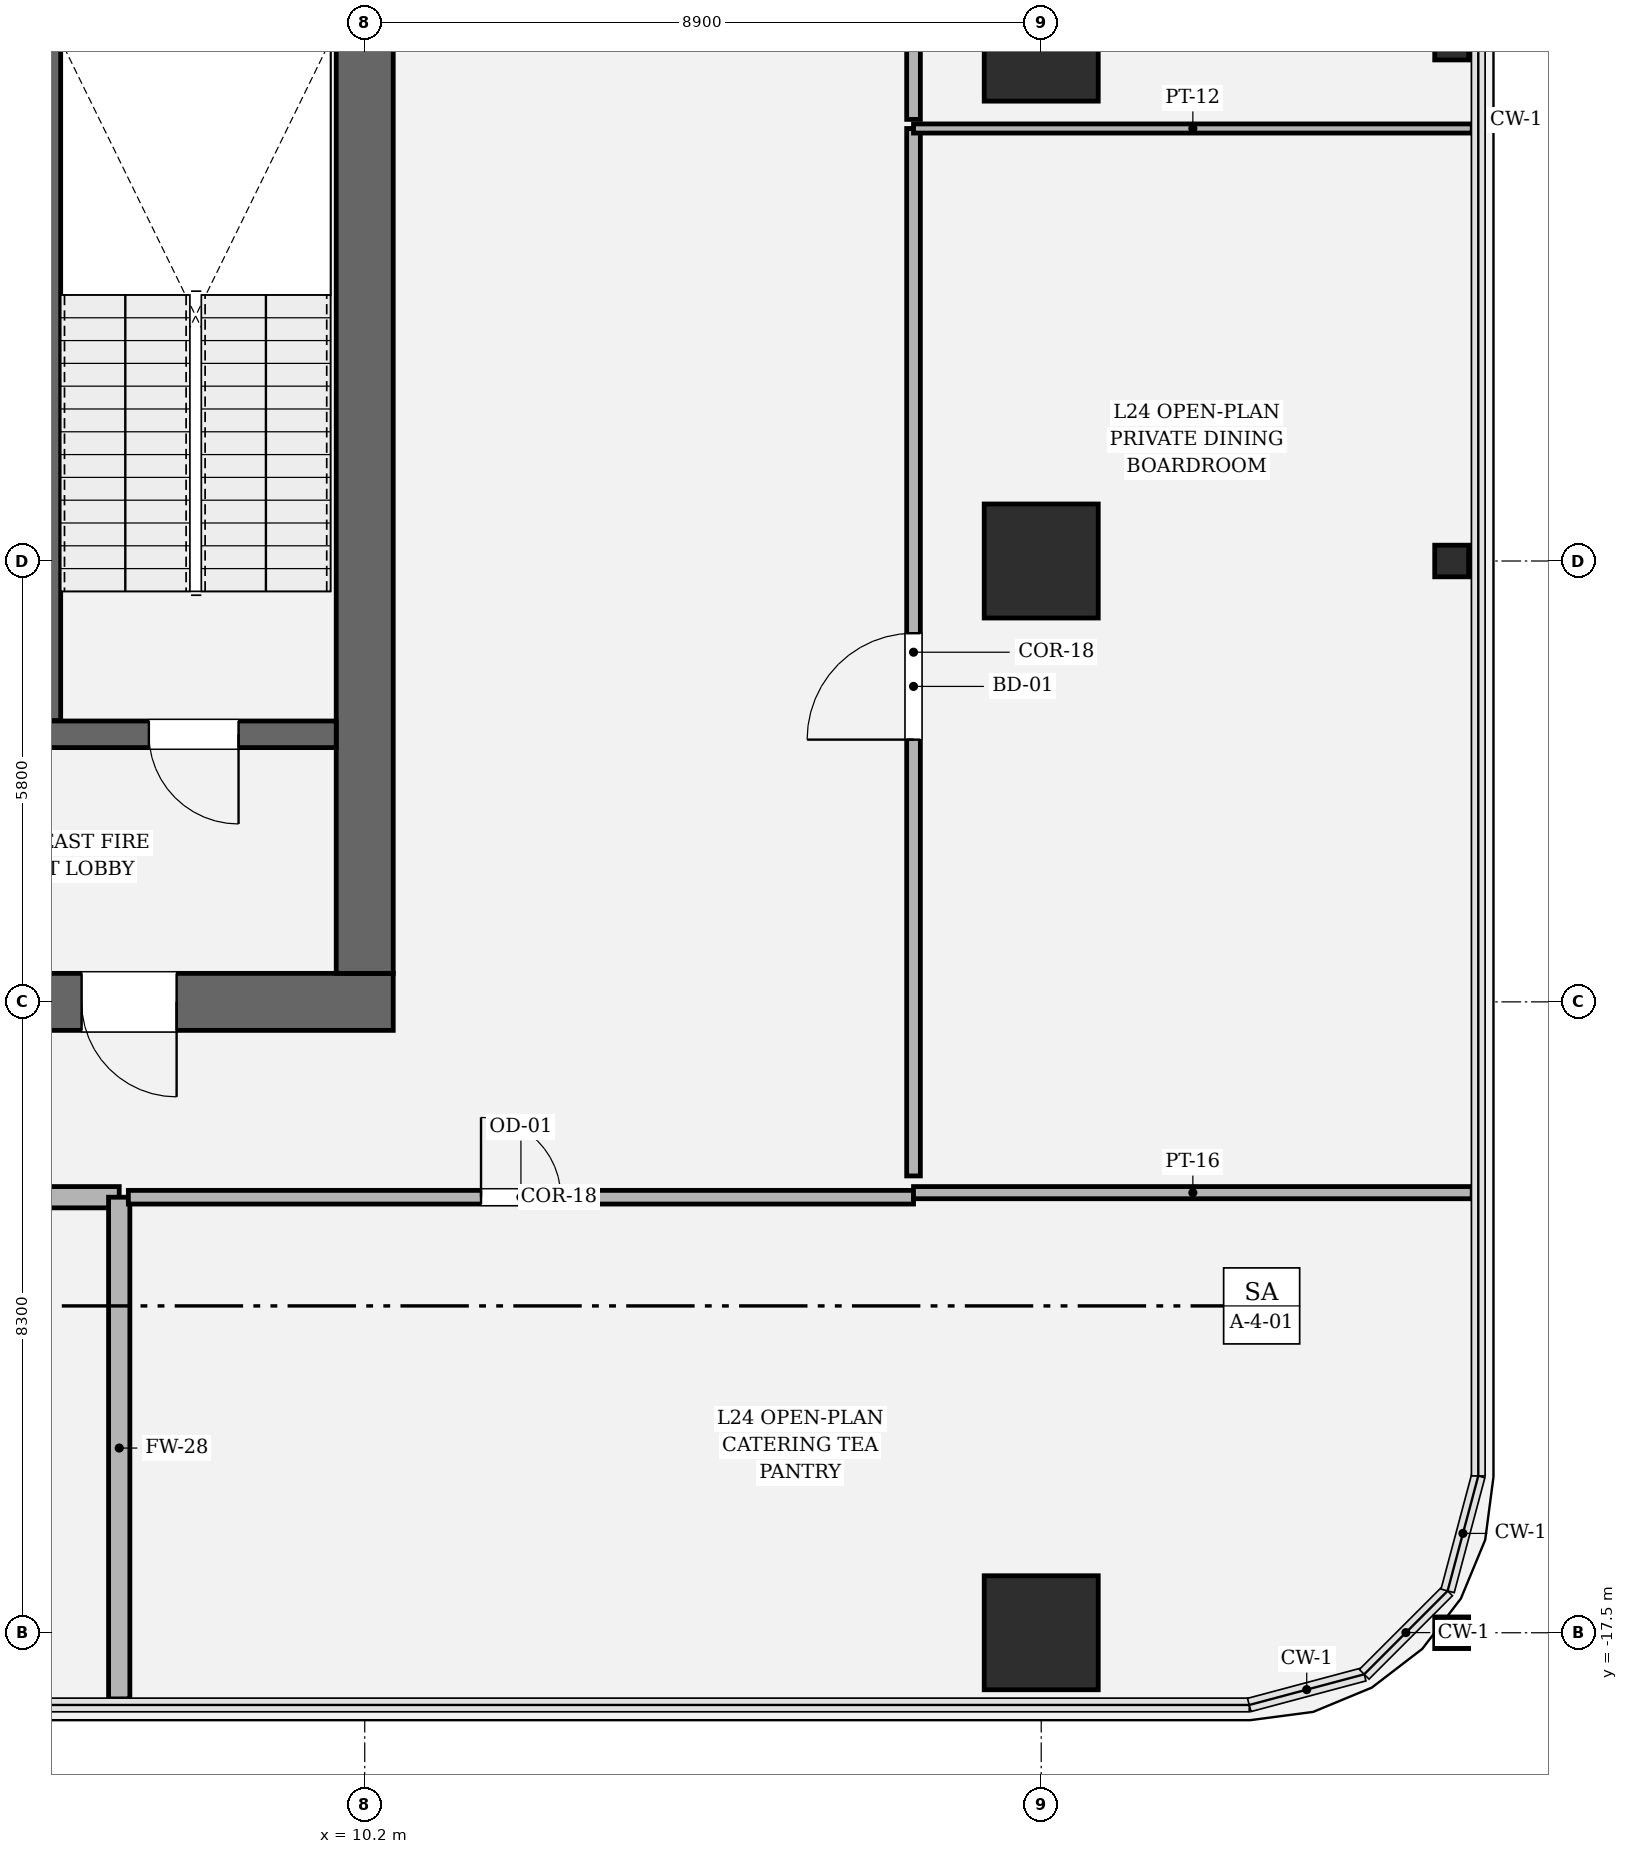
"""IFC4 building model, lengths in metres.
Left out: names, types, materials, properties, quantities, classifications, styles, units other than length and angle.
Written with IfcOpenShell. Run it as: python <this file> out.ifc"""

import sys

from ifc_helpers import new_model, si_unit, direction, frame, frame_2d, origin, origin_2d, place, context, subcontext, project, spatial, rectangle, hollow_rectangle, i_section, extrude, element, fill, save


model = new_model("IFC4")
c1 = context("Model", 3, precision=1e-05, world=origin(), true_north=direction((0.0, 1.0)))
c2 = subcontext(c1, "Body", "Model", "MODEL_VIEW")
j1 = project(units=[si_unit("LENGTHUNIT", "METRE"), si_unit("PLANEANGLEUNIT", "RADIAN")], contexts=[c1])
p1 = place(None, origin())
s1 = spatial("IfcSite", under=j1, at=p1, CompositionType="ELEMENT")
p2 = place(p1, origin())
s2 = spatial("IfcBuilding", under=s1, at=p2, CompositionType="ELEMENT")
p3 = place(p2, frame((0.0, 0.0, 105.15)))
s3 = spatial("IfcBuildingStorey", under=s2, at=p3, CompositionType="ELEMENT", Elevation=105.15)
p4 = place(p3, frame((10.575, -9.2, 0.0), z_axis=(0.0, 0.0, 1.0), x_axis=(-1.0, 0.0, 0.0)))
e1 = element("IfcWall", 1, at=p4, inside=s3, PredefinedType="SHEAR", context=c2, shape_type="SweptSolid", body=[
    extrude(rectangle(XDim=21.15, YDim=0.75, at=frame_2d((10.575, 0.0))), origin(), (0.0, 0.0, 1.0), 4.05),
])
p5 = place(p4, frame((2.85, 0.0, 0.0)))
e2 = element("IfcOpeningElement", 2, at=p5, cuts=e1, PredefinedType="OPENING", context=c2, shape_type="SweptSolid", body=[
    extrude(rectangle(XDim=1.25, YDim=2.25, at=frame_2d((0.625, 1.125))), frame((0.0, 0.385, 0.0), z_axis=(0.0, -1.0, 0.0), x_axis=(1.0, 0.0, 0.0)), (0.0, 0.0, 1.0), 0.77),
])
p6 = place(p4, frame((17.05, 0.0, 0.0)))
e3 = element("IfcOpeningElement", 3, at=p6, cuts=e1, PredefinedType="OPENING", context=c2, shape_type="SweptSolid", body=[
    extrude(rectangle(XDim=1.25, YDim=2.25, at=frame_2d((0.625, 1.125))), frame((0.0, 0.385, 0.0), z_axis=(0.0, -1.0, 0.0), x_axis=(1.0, 0.0, 0.0)), (0.0, 0.0, 1.0), 0.77),
])
p7 = place(p3, frame((10.2, 8.825, 0.0), z_axis=(0.0, 0.0, 1.0), x_axis=(0.0, -1.0, 0.0)))
e4 = element("IfcWall", 4, at=p7, inside=s3, PredefinedType="SHEAR", context=c2, shape_type="SweptSolid", body=[
    extrude(rectangle(XDim=17.65, YDim=0.75, at=frame_2d((8.825, 0.0))), origin(), (0.0, 0.0, 1.0), 4.05),
])
p8 = place(p7, frame((3.855, 0.0, 0.0)))
e5 = element("IfcOpeningElement", 5, at=p8, cuts=e4, PredefinedType="OPENING", context=c2, shape_type="SweptSolid", body=[
    extrude(rectangle(XDim=1.18, YDim=2.2, at=frame_2d((0.59, 1.1))), frame((0.0, 0.385, 0.0), z_axis=(0.0, -1.0, 0.0), x_axis=(1.0, 0.0, 0.0)), (0.0, 0.0, 1.0), 0.77),
])
p9 = place(p3, frame((6.05, 3.45, 0.0), z_axis=(0.0, 0.0, 1.0), x_axis=(0.0, -1.0, 0.0)))
e6 = element("IfcWall", 6, at=p9, inside=s3, PredefinedType="SOLIDWALL", context=c2, shape_type="SweptSolid", body=[
    extrude(rectangle(XDim=8.95, YDim=0.3, at=frame_2d((4.475, 0.0))), origin(), (0.0, 0.0, 1.0), 4.05),
])
p10 = place(p3, frame((4.65, -5.68, 0.0), z_axis=(0.0, 0.0, 1.0), x_axis=(1.0, 0.0, 0.0)))
e7 = element("IfcWall", 7, at=p10, inside=s3, PredefinedType="SOLIDWALL", context=c2, shape_type="SweptSolid", body=[
    extrude(rectangle(XDim=5.175, YDim=0.35, at=frame_2d((2.587, 0.0))), origin(), (0.0, 0.0, 1.0), 4.05),
])
p11 = place(p10, frame((2.71, 0.0, 0.0)))
e8 = element("IfcOpeningElement", 8, at=p11, cuts=e7, PredefinedType="OPENING", context=c2, shape_type="SweptSolid", body=[
    extrude(rectangle(XDim=1.18, YDim=2.2, at=frame_2d((0.59, 1.1))), frame((0.0, 0.185, 0.0), z_axis=(0.0, -1.0, 0.0), x_axis=(1.0, 0.0, 0.0)), (0.0, 0.0, 1.0), 0.37),
])
for number, where, z_axis, x_axis in (
    (9, (19.1, -17.5, 0.0), (0.0, 0.0, 1.0), (1.0, 0.0, 0.0)),
    (10, (19.1, -3.4, 0.0), (0.0, 0.0, 1.0), (1.0, 0.0, 0.0)),
    (11, (19.1, 3.4, 0.0), (0.0, 0.0, 1.0), (1.0, 0.0, 0.0)),
):
    element("IfcColumn", number, at=place(p3, frame(where, z_axis=z_axis, x_axis=x_axis)), inside=s3, PredefinedType="COLUMN", context=c2, shape_type="SweptSolid", body=[
        extrude(hollow_rectangle(XDim=1.5, YDim=1.5, WallThickness=0.045, at=origin_2d()), origin(), (0.0, 0.0, 1.0), 4.05),
    ])
for number, where, z_axis, x_axis in (
    (12, (24.5, -17.5, 0.0), (0.0, 0.0, 1.0), (0.0, 1.0, 0.0)),
    (13, (24.5, -3.4, 0.0), (0.0, 0.0, 1.0), (0.0, 1.0, 0.0)),
    (14, (24.5, 3.4, 0.0), (0.0, 0.0, 1.0), (0.0, 1.0, 0.0)),
):
    element("IfcColumn", number, at=place(p3, frame(where, z_axis=z_axis, x_axis=x_axis)), inside=s3, PredefinedType="COLUMN", context=c2, shape_type="SweptSolid", body=[
        extrude(i_section(OverallWidth=0.416, OverallDepth=0.446, WebThickness=0.039, FlangeThickness=0.062, FilletRadius=0.018, at=origin_2d()), origin(), (0.0, 0.0, 1.0), 4.048),
    ])
p12 = place(p3, frame((-7.4, -11.77, 0.0), z_axis=(0.0, 0.0, 1.0), x_axis=(1.0, 0.0, 0.0)))
e15 = element("IfcWall", 15, at=p12, inside=s3, PredefinedType="SOLIDWALL", context=c2, shape_type="SweptSolid", body=[
    extrude(rectangle(XDim=14.37, YDim=0.28, at=frame_2d((7.185, 0.0))), origin(), (0.0, 0.0, 1.0), 2.484),
])
p13 = place(p3, frame((6.97, -11.77, 0.0), z_axis=(0.0, 0.0, 1.0), x_axis=(0.0, -1.0, 0.0)))
e16 = element("IfcWall", 16, at=p13, inside=s3, PredefinedType="SOLIDWALL", context=c2, shape_type="SweptSolid", body=[
    extrude(rectangle(XDim=6.6, YDim=0.28, at=frame_2d((3.3, 0.0))), origin(), (0.0, 0.0, 1.0), 2.484),
])
p14 = place(p3, frame((7.09, -11.77, 0.0), z_axis=(0.0, 0.0, 1.0), x_axis=(1.0, 0.0, 0.0)))
e17 = element("IfcWall", 17, at=p14, inside=s3, PredefinedType="PARTITIONING", context=c2, shape_type="SweptSolid", body=[
    extrude(rectangle(XDim=10.33, YDim=0.18, at=frame_2d((5.165, 0.0))), origin(), (0.0, 0.0, 1.0), 2.484),
])
p15 = place(p14, frame((4.64, 0.0, 0.0)))
e18 = element("IfcOpeningElement", 18, at=p15, cuts=e17, PredefinedType="OPENING", context=c2, shape_type="SweptSolid", body=[
    extrude(rectangle(XDim=1.05, YDim=2.2, at=frame_2d((0.525, 1.1))), frame((0.0, 0.1, 0.0), z_axis=(0.0, -1.0, 0.0), x_axis=(1.0, 0.0, 0.0)), (0.0, 0.0, 1.0), 0.2),
])
p16 = place(p3, frame((17.42, -11.71, 0.0), z_axis=(0.0, 0.0, 1.0), x_axis=(1.0, 0.0, 0.0)))
e19 = element("IfcWall", 19, at=p16, inside=s3, PredefinedType="PARTITIONING", context=c2, shape_type="SweptSolid", body=[
    extrude(rectangle(XDim=7.35, YDim=0.16, at=frame_2d((3.675, 0.0))), origin(), (0.0, 0.0, 1.0), 2.484),
])
p17 = place(p3, frame((17.42, -11.49, 0.0), z_axis=(0.0, 0.0, 1.0), x_axis=(0.0, 1.0, 0.0)))
e20 = element("IfcWall", 20, at=p17, inside=s3, PredefinedType="PARTITIONING", context=c2, shape_type="SweptSolid", body=[
    extrude(rectangle(XDim=13.78, YDim=0.18, at=frame_2d((6.89, 0.0))), origin(), (0.0, 0.0, 1.0), 2.484),
])
p18 = place(p17, frame((5.74, 0.0, 0.0)))
e21 = element("IfcOpeningElement", 21, at=p18, cuts=e20, PredefinedType="OPENING", context=c2, shape_type="SweptSolid", body=[
    extrude(rectangle(XDim=1.4, YDim=2.25, at=frame_2d((0.7, 1.125))), frame((0.0, 0.1, 0.0), z_axis=(0.0, -1.0, 0.0), x_axis=(1.0, 0.0, 0.0)), (0.0, 0.0, 1.0), 0.2),
])
p19 = place(p3, frame((17.42, 2.29, 0.0), z_axis=(0.0, 0.0, 1.0), x_axis=(1.0, 0.0, 0.0)))
e22 = element("IfcWall", 22, at=p19, inside=s3, PredefinedType="PARTITIONING", context=c2, shape_type="SweptSolid", body=[
    extrude(rectangle(XDim=7.35, YDim=0.12, at=frame_2d((3.675, 0.0))), origin(), (0.0, 0.0, 1.0), 2.484),
])
p20 = place(p3, frame((17.42, 2.41, 0.0), z_axis=(0.0, 0.0, 1.0), x_axis=(0.0, 1.0, 0.0)))
e23 = element("IfcWall", 23, at=p20, inside=s3, PredefinedType="PARTITIONING", context=c2, shape_type="SweptSolid", body=[
    extrude(rectangle(XDim=12.21, YDim=0.18, at=frame_2d((6.105, 0.0))), origin(), (0.0, 0.0, 1.0), 2.484),
])
p21 = place(p20, frame((5.58, 0.0, 0.0)))
e24 = element("IfcOpeningElement", 24, at=p21, cuts=e23, PredefinedType="OPENING", context=c2, shape_type="SweptSolid", body=[
    extrude(rectangle(XDim=1.05, YDim=2.2, at=frame_2d((0.525, 1.1))), frame((0.0, 0.1, 0.0), z_axis=(0.0, -1.0, 0.0), x_axis=(1.0, 0.0, 0.0)), (0.0, 0.0, 1.0), 0.2),
])
p22 = place(p11, origin())
e25 = element("IfcDoor", 25, at=p22, inside=s3, OperationType="SINGLE_SWING_RIGHT", PredefinedType="DOOR", context=c2, shape_type="SweptSolid", body=[
    extrude(rectangle(XDim=1.18, YDim=2.2, at=frame_2d((0.59, 1.1))), frame((0.0, 0.025, 0.0), z_axis=(0.0, -1.0, 0.0), x_axis=(1.0, 0.0, 0.0)), (0.0, 0.0, 1.0), 0.05),
])
fill(e8, e25)
p23 = place(p5, origin())
e26 = element("IfcDoor", 26, at=p23, inside=s3, OperationType="SINGLE_SWING_LEFT", PredefinedType="DOOR", context=c2, shape_type="SweptSolid", body=[
    extrude(rectangle(XDim=1.25, YDim=2.25, at=frame_2d((0.625, 1.125))), frame((0.0, 0.025, 0.0), z_axis=(0.0, -1.0, 0.0), x_axis=(1.0, 0.0, 0.0)), (0.0, 0.0, 1.0), 0.05),
])
fill(e2, e26)
p24 = place(p15, origin())
e27 = element("IfcDoor", 27, at=p24, inside=s3, OperationType="SINGLE_SWING_LEFT", PredefinedType="DOOR", context=c2, shape_type="SweptSolid", body=[
    extrude(rectangle(XDim=1.05, YDim=2.2, at=frame_2d((0.525, 1.1))), frame((0.0, 0.025, 0.0), z_axis=(0.0, -1.0, 0.0), x_axis=(1.0, 0.0, 0.0)), (0.0, 0.0, 1.0), 0.05),
])
fill(e18, e27)
p25 = place(p18, origin())
e28 = element("IfcDoor", 28, at=p25, inside=s3, OperationType="SINGLE_SWING_LEFT", PredefinedType="DOOR", context=c2, shape_type="SweptSolid", body=[
    extrude(rectangle(XDim=1.4, YDim=2.25, at=frame_2d((0.7, 1.125))), frame((0.0, 0.025, 0.0), z_axis=(0.0, -1.0, 0.0), x_axis=(1.0, 0.0, 0.0)), (0.0, 0.0, 1.0), 0.05),
])
fill(e21, e28)
save(model, sys.argv[1])
